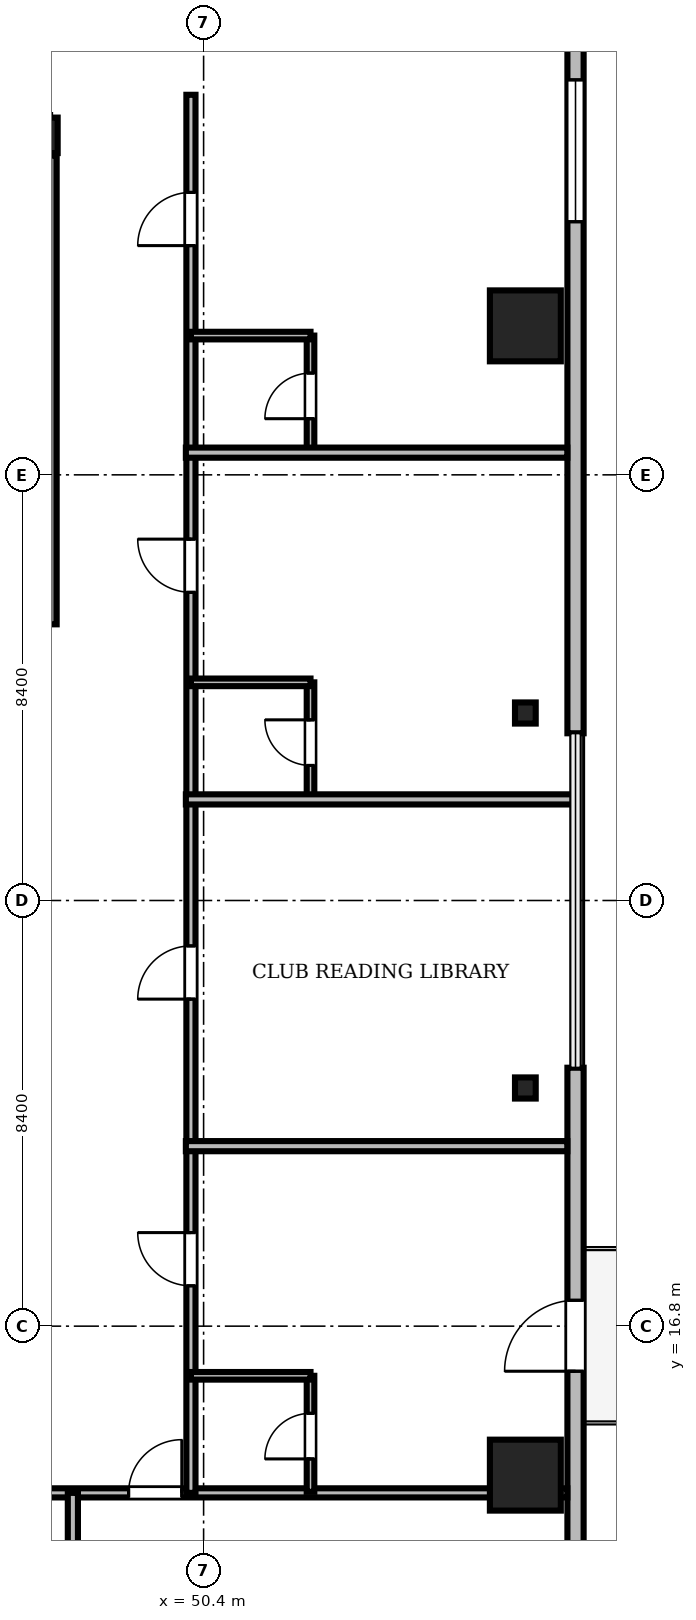
"""IFC4 building model, lengths in metres.
Left out: names, types, materials, properties, quantities, classifications, styles, units other than length and angle.
Written with IfcOpenShell. Run it as: python <this file> out.ifc"""

import sys

from ifc_helpers import new_model, si_unit, direction, frame, frame_2d, origin, origin_2d, place, context, subcontext, project, spatial, rectangle, i_section, extrude, source, transform, mapped, element, fill, save


model = new_model("IFC4")
c1 = context("Model", 3, precision=1e-05, world=origin(), true_north=direction((0.0, 1.0)))
c2 = subcontext(c1, "Body", "Model", "MODEL_VIEW")
j1 = project(units=[si_unit("LENGTHUNIT", "METRE"), si_unit("PLANEANGLEUNIT", "RADIAN")], contexts=[c1])
p1 = place(None, origin())
s1 = spatial("IfcSite", under=j1, at=p1, CompositionType="ELEMENT")
p2 = place(p1, origin())
s2 = spatial("IfcBuilding", under=s1, at=p2, CompositionType="ELEMENT")
p3 = place(p2, frame((0.0, 0.0, 181.0)))
s3 = spatial("IfcBuildingStorey", under=s2, at=p3, CompositionType="ELEMENT", Elevation=181.0)
m1 = source(origin(), c2, "Body", "SweptSolid", [
    extrude(i_section(OverallWidth=0.3, OverallDepth=0.7, WebThickness=0.017, FlangeThickness=0.032, FilletRadius=0.027, at=origin_2d()), origin(), (0.0, 0.0, 1.0), 3.58),
])
p4 = place(p3, frame((47.37, 40.3, 0.0), z_axis=(0.0, 0.0, 1.0), x_axis=(1.0, 0.0, 0.0)))
e1 = element("IfcColumn", 1, at=p4, inside=s3, PredefinedType="COLUMN", context=c2, shape_type="MappedRepresentation", body=[
    mapped(m1, transform((0.0, 0.0, 0.0), scale=1.0)),
])
m2 = source(origin(), c2, "Body", "SweptSolid", [
    extrude(rectangle(XDim=1.4, YDim=1.4, at=origin_2d()), origin(), (0.0, 0.0, 1.0), 3.58),
])
for number, where, z_axis, x_axis in (
    (2, (56.75, 13.86, 0.0), (0.0, 0.0, 1.0), (1.0, 0.0, 0.0)),
    (3, (56.75, 36.54, 0.0), (0.0, 0.0, 1.0), (1.0, 0.0, 0.0)),
):
    element("IfcColumn", number, at=place(p3, frame(where, z_axis=z_axis, x_axis=x_axis)), inside=s3, PredefinedType="COLUMN", context=c2, shape_type="MappedRepresentation", body=[
        mapped(m2, transform((0.0, 0.0, 0.0), scale=1.0)),
    ])
m3 = source(origin(), c2, "Body", "SweptSolid", [
    extrude(i_section(OverallWidth=0.409, OverallDepth=0.417, WebThickness=0.021, FlangeThickness=0.033, FilletRadius=0.015, at=origin_2d()), origin(), (0.0, 0.0, 1.0), 3.58),
])
for number, where, z_axis, x_axis in (
    (4, (56.75, 21.5, 0.0), (0.0, 0.0, 1.0), (1.0, 0.0, 0.0)),
    (5, (56.75, 28.9, 0.0), (0.0, 0.0, 1.0), (1.0, 0.0, 0.0)),
):
    element("IfcColumn", number, at=place(p3, frame(where, z_axis=z_axis, x_axis=x_axis)), inside=s3, PredefinedType="COLUMN", context=c2, shape_type="MappedRepresentation", body=[
        mapped(m3, transform((0.0, 0.0, 0.0), scale=1.0)),
    ])
m4 = source(origin(), c2, "Body", "SweptSolid", [
    extrude(rectangle(XDim=15.6, YDim=0.32, at=frame_2d((7.8, 0.0))), origin(), (0.0, 0.0, 1.0), 3.58),
])
p5 = place(p3, frame((57.74, 6.3, 0.0), z_axis=(0.0, 0.0, 1.0), x_axis=(0.0, 1.0, 0.0)))
e6 = element("IfcWall", 6, at=p5, inside=s3, PredefinedType="SOLIDWALL", context=c2, shape_type="MappedRepresentation", body=[
    mapped(m4, transform((0.0, 0.0, 0.0), scale=1.0)),
])
m5 = source(origin(), c2, "Body", "SweptSolid", [
    extrude(rectangle(XDim=1.4, YDim=2.3, at=frame_2d((0.7, 1.15))), frame((0.0, 0.17, 0.0), z_axis=(0.0, -1.0, 0.0), x_axis=(1.0, 0.0, 0.0)), (0.0, 0.0, 1.0), 0.34),
])
p6 = place(p5, frame((9.61, 0.0, 0.0)))
e7 = element("IfcOpeningElement", 7, at=p6, cuts=e6, PredefinedType="OPENING", context=c2, shape_type="MappedRepresentation", body=[
    mapped(m5, transform((0.0, 0.0, 0.0), scale=1.0)),
])
m6 = source(origin(), c2, "Body", "SweptSolid", [
    extrude(rectangle(XDim=2.8, YDim=2.4, at=frame_2d((1.4, 1.2))), frame((0.0, 0.17, 0.0), z_axis=(0.0, -1.0, 0.0), x_axis=(1.0, 0.0, 0.0)), (0.0, 0.0, 1.0), 0.34),
])
p7 = place(p5, frame((2.705, 0.0, 0.72)))
e8 = element("IfcOpeningElement", 8, at=p7, cuts=e6, PredefinedType="OPENING", context=c2, shape_type="MappedRepresentation", body=[
    mapped(m6, transform((0.0, 0.0, 0.0), scale=1.0)),
])
m7 = source(origin(), c2, "Body", "SweptSolid", [
    extrude(rectangle(XDim=15.6, YDim=0.32, at=frame_2d((7.8, 0.0))), origin(), (0.0, 0.0, 1.0), 3.58),
])
p8 = place(p3, frame((57.74, 28.5, 0.0), z_axis=(0.0, 0.0, 1.0), x_axis=(0.0, 1.0, 0.0)))
e9 = element("IfcWall", 9, at=p8, inside=s3, PredefinedType="SOLIDWALL", context=c2, shape_type="MappedRepresentation", body=[
    mapped(m7, transform((0.0, 0.0, 0.0), scale=1.0)),
])
p9 = place(p8, frame((10.095, 0.0, 0.72)))
e10 = element("IfcOpeningElement", 10, at=p9, cuts=e9, PredefinedType="OPENING", context=c2, shape_type="MappedRepresentation", body=[
    mapped(m6, transform((0.0, 0.0, 0.0), scale=1.0)),
])
m8 = source(origin(), c2, "Body", "SweptSolid", [
    extrude(rectangle(XDim=9.25, YDim=0.25, at=frame_2d((4.625, 0.0))), origin(), (0.0, 0.0, 1.0), 3.6),
])
p10 = place(p3, frame((47.375, 30.65, 0.0), z_axis=(0.0, 0.0, 1.0), x_axis=(0.0, 1.0, 0.0)))
e11 = element("IfcWall", 11, at=p10, inside=s3, PredefinedType="SOLIDWALL", context=c2, shape_type="MappedRepresentation", body=[
    mapped(m8, transform((0.0, 0.0, 0.0), scale=1.0)),
])
m9 = source(origin(), c2, "Body", "SweptSolid", [
    extrude(rectangle(XDim=46.156, YDim=0.18, at=frame_2d((23.078, 0.0))), origin(), (0.0, 0.0, 1.0), 2.822),
])
p11 = place(p3, frame((11.422, 13.51, 0.0), z_axis=(0.0, 0.0, 1.0), x_axis=(1.0, 0.0, 0.0)))
e12 = element("IfcWall", 12, at=p11, inside=s3, PredefinedType="PARTITIONING", context=c2, shape_type="MappedRepresentation", body=[
    mapped(m9, transform((0.0, 0.0, 0.0), scale=1.0)),
])
m10 = source(origin(), c2, "Body", "SweptSolid", [
    extrude(rectangle(XDim=1.05, YDim=2.2, at=frame_2d((0.525, 1.1))), frame((0.0, 0.1, 0.0), z_axis=(0.0, -1.0, 0.0), x_axis=(1.0, 0.0, 0.0)), (0.0, 0.0, 1.0), 0.2),
])
p12 = place(p11, frame((9.758, 0.0, 0.0)))
e13 = element("IfcOpeningElement", 13, at=p12, cuts=e12, PredefinedType="OPENING", context=c2, shape_type="MappedRepresentation", body=[
    mapped(m10, transform((0.0, 0.0, 0.0), scale=1.0)),
])
p13 = place(p11, frame((12.878, 0.0, 0.0)))
e14 = element("IfcOpeningElement", 14, at=p13, cuts=e12, PredefinedType="OPENING", context=c2, shape_type="MappedRepresentation", body=[
    mapped(m10, transform((0.0, 0.0, 0.0), scale=1.0)),
])
p14 = place(p11, frame((16.893, 0.0, 0.0)))
e15 = element("IfcOpeningElement", 15, at=p14, cuts=e12, PredefinedType="OPENING", context=c2, shape_type="MappedRepresentation", body=[
    mapped(m10, transform((0.0, 0.0, 0.0), scale=1.0)),
])
p15 = place(p11, frame((20.344, 0.0, 0.0)))
e16 = element("IfcOpeningElement", 16, at=p15, cuts=e12, PredefinedType="OPENING", context=c2, shape_type="MappedRepresentation", body=[
    mapped(m10, transform((0.0, 0.0, 0.0), scale=1.0)),
])
p16 = place(p11, frame((24.008, 0.0, 0.0)))
e17 = element("IfcOpeningElement", 17, at=p16, cuts=e12, PredefinedType="OPENING", context=c2, shape_type="MappedRepresentation", body=[
    mapped(m10, transform((0.0, 0.0, 0.0), scale=1.0)),
])
p17 = place(p11, frame((28.055, 0.0, 0.0)))
e18 = element("IfcOpeningElement", 18, at=p17, cuts=e12, PredefinedType="OPENING", context=c2, shape_type="MappedRepresentation", body=[
    mapped(m10, transform((0.0, 0.0, 0.0), scale=1.0)),
])
m11 = source(origin(), c2, "Body", "SweptSolid", [
    extrude(rectangle(XDim=0.95, YDim=2.15, at=frame_2d((0.475, 1.075))), frame((0.0, 0.1, 0.0), z_axis=(0.0, -1.0, 0.0), x_axis=(1.0, 0.0, 0.0)), (0.0, 0.0, 1.0), 0.2),
])
p18 = place(p11, frame((34.246, 0.0, 0.0)))
e19 = element("IfcOpeningElement", 19, at=p18, cuts=e12, PredefinedType="OPENING", context=c2, shape_type="MappedRepresentation", body=[
    mapped(m11, transform((0.0, 0.0, 0.0), scale=1.0)),
])
p19 = place(p11, frame((37.498, 0.0, 0.0)))
e20 = element("IfcOpeningElement", 20, at=p19, cuts=e12, PredefinedType="OPENING", context=c2, shape_type="MappedRepresentation", body=[
    mapped(m10, transform((0.0, 0.0, 0.0), scale=1.0)),
])
m12 = source(origin(), c2, "Body", "SweptSolid", [
    extrude(rectangle(XDim=27.59, YDim=0.18, at=frame_2d((13.795, 0.0))), origin(), (0.0, 0.0, 1.0), 3.022),
])
p20 = place(p3, frame((50.15, 13.51, 0.0), z_axis=(0.0, 0.0, 1.0), x_axis=(0.0, 1.0, 0.0)))
e21 = element("IfcWall", 21, at=p20, inside=s3, PredefinedType="PARTITIONING", context=c2, shape_type="MappedRepresentation", body=[
    mapped(m12, transform((0.0, 0.0, 0.0), scale=1.0)),
])
p21 = place(p20, frame((4.086, 0.0, 0.0)))
e22 = element("IfcOpeningElement", 22, at=p21, cuts=e21, PredefinedType="OPENING", context=c2, shape_type="MappedRepresentation", body=[
    mapped(m10, transform((0.0, 0.0, 0.0), scale=1.0)),
])
p22 = place(p20, frame((9.744, 0.0, 0.0)))
e23 = element("IfcOpeningElement", 23, at=p22, cuts=e21, PredefinedType="OPENING", context=c2, shape_type="MappedRepresentation", body=[
    mapped(m10, transform((0.0, 0.0, 0.0), scale=1.0)),
])
p23 = place(p20, frame((17.771, 0.0, 0.0)))
e24 = element("IfcOpeningElement", 24, at=p23, cuts=e21, PredefinedType="OPENING", context=c2, shape_type="MappedRepresentation", body=[
    mapped(m10, transform((0.0, 0.0, 0.0), scale=1.0)),
])
p24 = place(p20, frame((24.614, 0.0, 0.0)))
e25 = element("IfcOpeningElement", 25, at=p24, cuts=e21, PredefinedType="OPENING", context=c2, shape_type="MappedRepresentation", body=[
    mapped(m10, transform((0.0, 0.0, 0.0), scale=1.0)),
])
m13 = source(origin(), c2, "Body", "SweptSolid", [
    extrude(rectangle(XDim=2.29, YDim=0.15, at=frame_2d((1.145, 0.0))), origin(), (0.0, 0.0, 1.0), 3.022),
])
p25 = place(p3, frame((52.51, 13.53, 0.0), z_axis=(0.0, 0.0, 1.0), x_axis=(0.0, 1.0, 0.0)))
e26 = element("IfcWall", 26, at=p25, inside=s3, PredefinedType="PARTITIONING", context=c2, shape_type="MappedRepresentation", body=[
    mapped(m13, transform((0.0, 0.0, 0.0), scale=1.0)),
])
m14 = source(origin(), c2, "Body", "SweptSolid", [
    extrude(rectangle(XDim=0.9, YDim=2.1, at=frame_2d((0.45, 1.05))), frame((0.0, 0.085, 0.0), z_axis=(0.0, -1.0, 0.0), x_axis=(1.0, 0.0, 0.0)), (0.0, 0.0, 1.0), 0.17),
])
p26 = place(p25, frame((0.65, 0.0, 0.0)))
e27 = element("IfcOpeningElement", 27, at=p26, cuts=e26, PredefinedType="OPENING", context=c2, shape_type="MappedRepresentation", body=[
    mapped(m14, transform((0.0, 0.0, 0.0), scale=1.0)),
])
m15 = source(origin(), c2, "Body", "SweptSolid", [
    extrude(rectangle(XDim=2.29, YDim=0.15, at=frame_2d((1.145, 0.0))), origin(), (0.0, 0.0, 1.0), 3.022),
])
p27 = place(p3, frame((52.51, 27.215, 0.0), z_axis=(0.0, 0.0, 1.0), x_axis=(0.0, 1.0, 0.0)))
e28 = element("IfcWall", 28, at=p27, inside=s3, PredefinedType="PARTITIONING", context=c2, shape_type="MappedRepresentation", body=[
    mapped(m15, transform((0.0, 0.0, 0.0), scale=1.0)),
])
p28 = place(p27, frame((0.65, 0.0, 0.0)))
e29 = element("IfcOpeningElement", 29, at=p28, cuts=e28, PredefinedType="OPENING", context=c2, shape_type="MappedRepresentation", body=[
    mapped(m14, transform((0.0, 0.0, 0.0), scale=1.0)),
])
m16 = source(origin(), c2, "Body", "SweptSolid", [
    extrude(rectangle(XDim=2.29, YDim=0.15, at=frame_2d((1.145, 0.0))), origin(), (0.0, 0.0, 1.0), 3.58),
])
p29 = place(p3, frame((52.51, 34.058, 0.0), z_axis=(0.0, 0.0, 1.0), x_axis=(0.0, 1.0, 0.0)))
e30 = element("IfcWall", 30, at=p29, inside=s3, PredefinedType="PARTITIONING", context=c2, shape_type="MappedRepresentation", body=[
    mapped(m16, transform((0.0, 0.0, 0.0), scale=1.0)),
])
p30 = place(p29, frame((0.65, 0.0, 0.0)))
e31 = element("IfcOpeningElement", 31, at=p30, cuts=e30, PredefinedType="OPENING", context=c2, shape_type="MappedRepresentation", body=[
    mapped(m14, transform((0.0, 0.0, 0.0), scale=1.0)),
])
m17 = source(origin(), c2, "Body", "SweptSolid", [
    extrude(rectangle(XDim=11.388, YDim=0.2, at=frame_2d((5.694, 0.0))), origin(), (0.0, 0.0, 1.0), 2.822),
])
p31 = place(p3, frame((47.82, 2.122, 0.0), z_axis=(0.0, 0.0, 1.0), x_axis=(0.0, 1.0, 0.0)))
e32 = element("IfcWall", 32, at=p31, inside=s3, PredefinedType="PARTITIONING", context=c2, shape_type="MappedRepresentation", body=[
    mapped(m17, transform((0.0, 0.0, 0.0), scale=1.0)),
])
m18 = source(origin(), c2, "Body", "SweptSolid", [
    extrude(rectangle(XDim=7.528, YDim=0.2, at=frame_2d((3.764, 0.0))), origin(), (0.0, 0.0, 1.0), 2.822),
])
p32 = place(p3, frame((50.05, 20.352, 0.0), z_axis=(0.0, 0.0, 1.0), x_axis=(1.0, 0.0, 0.0)))
e33 = element("IfcWall", 33, at=p32, inside=s3, PredefinedType="PARTITIONING", context=c2, shape_type="MappedRepresentation", body=[
    mapped(m18, transform((0.0, 0.0, 0.0), scale=1.0)),
])
m19 = source(origin(), c2, "Body", "SweptSolid", [
    extrude(rectangle(XDim=7.72, YDim=0.2, at=frame_2d((3.86, 0.0))), origin(), (0.0, 0.0, 1.0), 2.822),
])
p33 = place(p3, frame((50.05, 27.195, 0.0), z_axis=(0.0, 0.0, 1.0), x_axis=(1.0, 0.0, 0.0)))
e34 = element("IfcWall", 34, at=p33, inside=s3, PredefinedType="PARTITIONING", context=c2, shape_type="MappedRepresentation", body=[
    mapped(m19, transform((0.0, 0.0, 0.0), scale=1.0)),
])
p34 = place(p3, frame((50.05, 34.038, 0.0), z_axis=(0.0, 0.0, 1.0), x_axis=(1.0, 0.0, 0.0)))
e35 = element("IfcWall", 35, at=p34, inside=s3, PredefinedType="PARTITIONING", context=c2, shape_type="MappedRepresentation", body=[
    mapped(m18, transform((0.0, 0.0, 0.0), scale=1.0)),
])
m20 = source(origin(), c2, "Body", "SweptSolid", [
    extrude(rectangle(XDim=2.36, YDim=0.15, at=frame_2d((1.18, 0.0))), origin(), (0.0, 0.0, 1.0), 3.58),
])
for number, where, z_axis, x_axis in (
    (36, (50.15, 15.82, 0.0), (0.0, 0.0, 1.0), (1.0, 0.0, 0.0)),
    (37, (50.15, 29.505, 0.0), (0.0, 0.0, 1.0), (1.0, 0.0, 0.0)),
    (38, (50.15, 36.348, 0.0), (0.0, 0.0, 1.0), (1.0, 0.0, 0.0)),
):
    element("IfcWall", number, at=place(p3, frame(where, z_axis=z_axis, x_axis=x_axis)), inside=s3, PredefinedType="PARTITIONING", context=c2, shape_type="MappedRepresentation", body=[
        mapped(m20, transform((0.0, 0.0, 0.0), scale=1.0)),
    ])
m21 = source(origin(), c2, "Body", "SweptSolid", [
    extrude(rectangle(XDim=1.4, YDim=2.3, at=frame_2d((0.7, 1.15))), frame((0.0, 0.025, 0.0), z_axis=(0.0, -1.0, 0.0), x_axis=(1.0, 0.0, 0.0)), (0.0, 0.0, 1.0), 0.05),
])
p35 = place(p6, frame((1.4, 0.0, 0.0), z_axis=(0.0, 0.0, 1.0), x_axis=(-1.0, 0.0, 0.0)))
e39 = element("IfcDoor", 39, at=p35, inside=s3, OperationType="DOUBLE_DOOR_SLIDING", PredefinedType="DOOR", context=c2, shape_type="MappedRepresentation", body=[
    mapped(m21, transform((0.0, 0.0, 0.0), scale=1.0)),
])
fill(e7, e39)
m22 = source(origin(), c2, "Body", "SweptSolid", [
    extrude(rectangle(XDim=2.8, YDim=2.4, at=frame_2d((1.4, 1.2))), frame((0.0, 0.03, 0.0), z_axis=(0.0, -1.0, 0.0), x_axis=(1.0, 0.0, 0.0)), (0.0, 0.0, 1.0), 0.06),
])
p36 = place(p9, origin())
e40 = element("IfcWindow", 40, at=p36, inside=s3, PartitioningType="SINGLE_PANEL", PredefinedType="WINDOW", context=c2, shape_type="MappedRepresentation", body=[
    mapped(m22, transform((0.0, 0.0, 0.0), scale=1.0)),
])
fill(e10, e40)
m23 = source(origin(), c2, "Body", "SweptSolid", [
    extrude(rectangle(XDim=1.05, YDim=2.2, at=frame_2d((0.525, 1.1))), frame((0.0, 0.025, 0.0), z_axis=(0.0, -1.0, 0.0), x_axis=(1.0, 0.0, 0.0)), (0.0, 0.0, 1.0), 0.05),
])
p37 = place(p19, origin())
e41 = element("IfcDoor", 41, at=p37, inside=s3, OperationType="SINGLE_SWING_RIGHT", PredefinedType="DOOR", context=c2, shape_type="MappedRepresentation", body=[
    mapped(m23, transform((0.0, 0.0, 0.0), scale=1.0)),
])
fill(e20, e41)
p38 = place(p21, origin())
e42 = element("IfcDoor", 42, at=p38, inside=s3, OperationType="SINGLE_SWING_RIGHT", PredefinedType="DOOR", context=c2, shape_type="MappedRepresentation", body=[
    mapped(m23, transform((0.0, 0.0, 0.0), scale=1.0)),
])
fill(e22, e42)
p39 = place(p22, origin())
e43 = element("IfcDoor", 43, at=p39, inside=s3, OperationType="SINGLE_SWING_LEFT", PredefinedType="DOOR", context=c2, shape_type="MappedRepresentation", body=[
    mapped(m23, transform((0.0, 0.0, 0.0), scale=1.0)),
])
fill(e23, e43)
p40 = place(p23, origin())
e44 = element("IfcDoor", 44, at=p40, inside=s3, OperationType="SINGLE_SWING_RIGHT", PredefinedType="DOOR", context=c2, shape_type="MappedRepresentation", body=[
    mapped(m23, transform((0.0, 0.0, 0.0), scale=1.0)),
])
fill(e24, e44)
p41 = place(p24, origin())
e45 = element("IfcDoor", 45, at=p41, inside=s3, OperationType="SINGLE_SWING_LEFT", PredefinedType="DOOR", context=c2, shape_type="MappedRepresentation", body=[
    mapped(m23, transform((0.0, 0.0, 0.0), scale=1.0)),
])
fill(e25, e45)
m24 = source(origin(), c2, "Body", "SweptSolid", [
    extrude(rectangle(XDim=0.9, YDim=2.1, at=frame_2d((0.45, 1.05))), frame((0.0, 0.025, 0.0), z_axis=(0.0, -1.0, 0.0), x_axis=(1.0, 0.0, 0.0)), (0.0, 0.0, 1.0), 0.05),
])
p42 = place(p26, origin())
e46 = element("IfcDoor", 46, at=p42, inside=s3, OperationType="SINGLE_SWING_LEFT", PredefinedType="DOOR", context=c2, shape_type="MappedRepresentation", body=[
    mapped(m24, transform((0.0, 0.0, 0.0), scale=1.0)),
])
fill(e27, e46)
p43 = place(p28, origin())
e47 = element("IfcDoor", 47, at=p43, inside=s3, OperationType="SINGLE_SWING_RIGHT", PredefinedType="DOOR", context=c2, shape_type="MappedRepresentation", body=[
    mapped(m24, transform((0.0, 0.0, 0.0), scale=1.0)),
])
fill(e29, e47)
p44 = place(p30, origin())
e48 = element("IfcDoor", 48, at=p44, inside=s3, OperationType="SINGLE_SWING_LEFT", PredefinedType="DOOR", context=c2, shape_type="MappedRepresentation", body=[
    mapped(m24, transform((0.0, 0.0, 0.0), scale=1.0)),
])
fill(e31, e48)
save(model, sys.argv[1])
